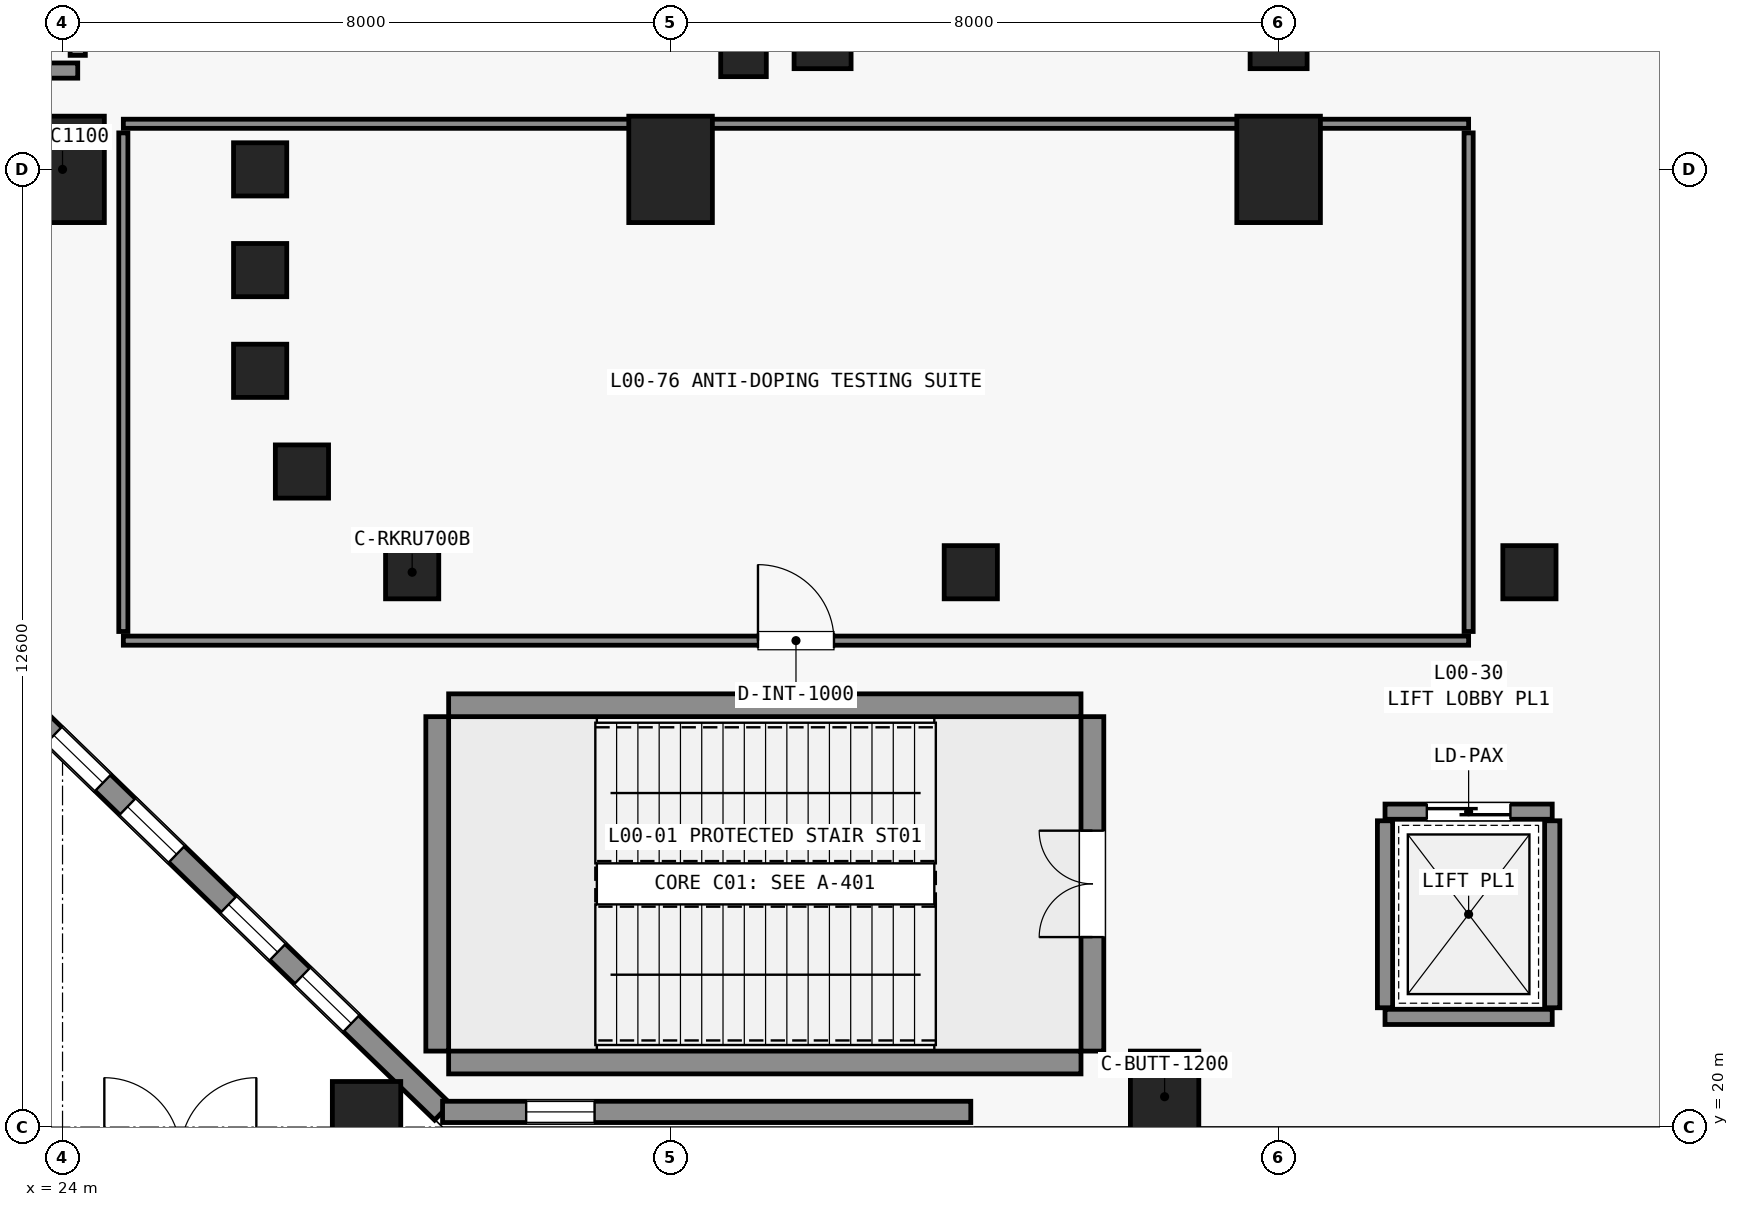
"""IFC4 building model, lengths in metres.
Left out: names, types, materials, properties, quantities, classifications, styles, units other than length and angle.
Written with IfcOpenShell. Run it as: python <this file> out.ifc"""

import sys

from ifc_helpers import new_model, si_unit, direction, frame, frame_2d, origin, origin_2d, place, context, subcontext, project, spatial, rectangle, extrude, element, fill, save


model = new_model("IFC4")
c1 = context("Model", 3, precision=1e-05, world=origin(), true_north=direction((0.0, 1.0)))
c2 = subcontext(c1, "Body", "Model", "MODEL_VIEW")
j1 = project(units=[si_unit("LENGTHUNIT", "METRE"), si_unit("PLANEANGLEUNIT", "RADIAN")], contexts=[c1])
p1 = place(None, origin())
s1 = spatial("IfcSite", under=j1, at=p1, CompositionType="ELEMENT")
p2 = place(p1, origin())
s2 = spatial("IfcBuilding", under=s1, at=p2, CompositionType="ELEMENT")
p3 = place(p2, origin())
s3 = spatial("IfcBuildingStorey", under=s2, at=p3, CompositionType="ELEMENT", Elevation=0.0)
for number, where, z_axis, x_axis in (
    (1, (24.0, 32.6, 0.0), (0.0, 0.0, 1.0), (1.0, 0.0, 0.0)),
    (2, (32.0, 32.6, 0.0), (0.0, 0.0, 1.0), (1.0, 0.0, 0.0)),
    (3, (40.0, 32.6, 0.0), (0.0, 0.0, 1.0), (1.0, 0.0, 0.0)),
):
    element("IfcColumn", number, at=place(p3, frame(where, z_axis=z_axis, x_axis=x_axis)), inside=s3, PredefinedType="COLUMN", context=c2, shape_type="SweptSolid", body=[
        extrude(rectangle(XDim=1.1, YDim=1.4, at=origin_2d()), origin(), (0.0, 0.0, 1.0), 6.0),
    ])
p4 = place(p3, frame((38.5, 20.4, 0.0), z_axis=(0.0, 0.0, 1.0), x_axis=(1.0, 0.0, 0.0)))
e4 = element("IfcColumn", 4, at=p4, inside=s3, PredefinedType="PILASTER", context=c2, shape_type="SweptSolid", body=[
    extrude(rectangle(XDim=0.9, YDim=1.2, at=origin_2d()), origin(), (0.0, 0.0, 1.0), 6.0),
])
p5 = place(p3, frame((28.0, 20.0, -0.45), z_axis=(0.0, 0.0, 1.0), x_axis=(1.0, 0.0, 0.0)))
e5 = element("IfcColumn", 5, at=p5, inside=s3, PredefinedType="PILASTER", context=c2, shape_type="SweptSolid", body=[
    extrude(rectangle(XDim=0.9, YDim=1.2, at=origin_2d()), origin(), (0.0, 0.0, 1.0), 6.45),
])
for number, where, z_axis, x_axis in (
    (6, (29.08, 20.85, 0.0), (0.0, 0.0, 1.0), (1.0, 0.0, 0.0)),
    (7, (29.08, 25.55, 0.0), (0.0, 0.0, 1.0), (1.0, 0.0, 0.0)),
):
    element("IfcWall", number, at=place(p3, frame(where, z_axis=z_axis, x_axis=x_axis)), inside=s3, PredefinedType="SHEAR", context=c2, shape_type="SweptSolid", body=[
        extrude(rectangle(XDim=8.32, YDim=0.3, at=frame_2d((4.16, 0.0))), origin(), (0.0, 0.0, 1.0), 6.0),
    ])
p6 = place(p3, frame((28.93, 21.0, 0.0), z_axis=(0.0, 0.0, 1.0), x_axis=(0.0, 1.0, 0.0)))
e8 = element("IfcWall", 8, at=p6, inside=s3, PredefinedType="SHEAR", context=c2, shape_type="SweptSolid", body=[
    extrude(rectangle(XDim=4.4, YDim=0.3, at=frame_2d((2.2, 0.0))), origin(), (0.0, 0.0, 1.0), 6.0),
])
p7 = place(p3, frame((37.55, 21.0, 0.0), z_axis=(0.0, 0.0, 1.0), x_axis=(0.0, 1.0, 0.0)))
e9 = element("IfcWall", 9, at=p7, inside=s3, PredefinedType="SHEAR", context=c2, shape_type="SweptSolid", body=[
    extrude(rectangle(XDim=4.4, YDim=0.3, at=frame_2d((2.2, 0.0))), origin(), (0.0, 0.0, 1.0), 6.0),
])
p8 = place(p7, frame((1.5, 0.0, 0.0)))
e10 = element("IfcOpeningElement", 10, at=p8, cuts=e9, PredefinedType="OPENING", context=c2, shape_type="SweptSolid", body=[
    extrude(rectangle(XDim=1.4, YDim=2.2, at=frame_2d((0.7, 1.1))), frame((0.0, 0.16, 0.0), z_axis=(0.0, -1.0, 0.0), x_axis=(1.0, 0.0, 0.0)), (0.0, 0.0, 1.0), 0.32),
])
p9 = place(p3, frame((34.0, 34.3, 0.0), z_axis=(0.0, 0.0, 1.0), x_axis=(1.0, 0.0, 0.0)))
e11 = element("IfcColumn", 11, at=p9, inside=s3, PredefinedType="COLUMN", context=c2, shape_type="SweptSolid", body=[
    extrude(rectangle(XDim=0.75, YDim=0.75, at=origin_2d()), origin(), (0.0, 0.0, 1.0), 6.0),
])
p10 = place(p3, frame((28.6, 27.3, 0.0), z_axis=(0.0, 0.0, 1.0), x_axis=(1.0, 0.0, 0.0)))
e12 = element("IfcColumn", 12, at=p10, inside=s3, PredefinedType="COLUMN", context=c2, shape_type="SweptSolid", body=[
    extrude(rectangle(XDim=0.7, YDim=0.7, at=origin_2d()), origin(), (0.0, 0.0, 1.0), 6.0),
])
p11 = place(p3, frame((40.0, 34.3, 0.0), z_axis=(0.0, 0.0, 1.0), x_axis=(1.0, 0.0, 0.0)))
e13 = element("IfcColumn", 13, at=p11, inside=s3, PredefinedType="COLUMN", context=c2, shape_type="SweptSolid", body=[
    extrude(rectangle(XDim=0.75, YDim=0.75, at=origin_2d()), origin(), (0.0, 0.0, 1.0), 6.0),
])
for number, where, z_axis, x_axis in (
    (14, (35.95, 27.3, 0.0), (0.0, 0.0, 1.0), (1.0, 0.0, 0.0)),
    (15, (43.3, 27.3, 0.0), (0.0, 0.0, 1.0), (1.0, 0.0, 0.0)),
    (16, (26.6, 32.6, 0.0), (0.0, 0.0, 1.0), (1.0, 0.0, 0.0)),
    (17, (26.6, 31.275, 0.0), (0.0, 0.0, 1.0), (1.0, 0.0, 0.0)),
    (18, (26.6, 29.95, 0.0), (0.0, 0.0, 1.0), (1.0, 0.0, 0.0)),
    (19, (27.15, 28.625, 0.0), (0.0, 0.0, 1.0), (1.0, 0.0, 0.0)),
):
    element("IfcColumn", number, at=place(p3, frame(where, z_axis=z_axis, x_axis=x_axis)), inside=s3, PredefinedType="COLUMN", context=c2, shape_type="SweptSolid", body=[
        extrude(rectangle(XDim=0.7, YDim=0.7, at=origin_2d()), origin(), (0.0, 0.0, 1.0), 6.0),
    ])
p12 = place(p3, frame((32.96, 34.12, 0.0), z_axis=(0.0, 0.0, 1.0), x_axis=(1.0, 0.0, 0.0)))
e20 = element("IfcColumn", 20, at=p12, inside=s3, PredefinedType="COLUMN", context=c2, shape_type="SweptSolid", body=[
    extrude(rectangle(XDim=0.6, YDim=0.6, at=origin_2d()), origin(), (0.0, 0.0, 1.0), 6.0),
])
p13 = place(p3, frame((41.4, 21.45, 0.0), z_axis=(0.0, 0.0, 1.0), x_axis=(1.0, 0.0, 0.0)))
e21 = element("IfcWall", 21, at=p13, inside=s3, PredefinedType="STANDARD", context=c2, shape_type="SweptSolid", body=[
    extrude(rectangle(XDim=2.2, YDim=0.2, at=frame_2d((1.1, 0.0))), origin(), (0.0, 0.0, 1.0), 5.64),
])
p14 = place(p3, frame((41.4, 24.15, 0.0), z_axis=(0.0, 0.0, 1.0), x_axis=(1.0, 0.0, 0.0)))
e22 = element("IfcWall", 22, at=p14, inside=s3, PredefinedType="STANDARD", context=c2, shape_type="SweptSolid", body=[
    extrude(rectangle(XDim=2.2, YDim=0.2, at=frame_2d((1.1, 0.0))), origin(), (0.0, 0.0, 1.0), 5.64),
])
p15 = place(p14, frame((0.55, 0.0, 0.0)))
e23 = element("IfcOpeningElement", 23, at=p15, cuts=e22, PredefinedType="OPENING", context=c2, shape_type="SweptSolid", body=[
    extrude(rectangle(XDim=1.1, YDim=2.15, at=frame_2d((0.55, 1.075))), frame((0.0, 0.11, 0.0), z_axis=(0.0, -1.0, 0.0), x_axis=(1.0, 0.0, 0.0)), (0.0, 0.0, 1.0), 0.22),
])
for number, where, z_axis, x_axis in (
    (24, (41.4, 21.57, 0.0), (0.0, 0.0, 1.0), (0.0, 1.0, 0.0)),
    (25, (43.6, 21.57, 0.0), (0.0, 0.0, 1.0), (0.0, 1.0, 0.0)),
):
    element("IfcWall", number, at=place(p3, frame(where, z_axis=z_axis, x_axis=x_axis)), inside=s3, PredefinedType="STANDARD", context=c2, shape_type="SweptSolid", body=[
        extrude(rectangle(XDim=2.46, YDim=0.2, at=frame_2d((1.23, 0.0))), origin(), (0.0, 0.0, 1.0), 5.64),
    ])
p16 = place(p3, frame((16.2, 32.6, 0.0), z_axis=(0.0, 0.0, 1.0), x_axis=(0.718237441527, -0.695798086796, 0.0)))
e26 = element("IfcWall", 26, at=p16, inside=s3, PredefinedType="STANDARD", context=c2, shape_type="SweptSolid", body=[
    extrude(rectangle(XDim=17.822, YDim=0.3, at=frame_2d((8.911, 0.0))), origin(), (0.0, 0.0, 1.0), 4.79),
])
p17 = place(p16, frame((1.1, 0.0, 0.95)))
e27 = element("IfcOpeningElement", 27, at=p17, cuts=e26, PredefinedType="OPENING", context=c2, shape_type="SweptSolid", body=[
    extrude(rectangle(XDim=0.9, YDim=2.85, at=frame_2d((0.45, 1.425))), frame((0.0, 0.16, 0.0), z_axis=(0.0, -1.0, 0.0), x_axis=(1.0, 0.0, 0.0)), (0.0, 0.0, 1.0), 0.32),
])
p18 = place(p16, frame((2.45, 0.0, 0.95)))
e28 = element("IfcOpeningElement", 28, at=p18, cuts=e26, PredefinedType="OPENING", context=c2, shape_type="SweptSolid", body=[
    extrude(rectangle(XDim=0.9, YDim=2.85, at=frame_2d((0.45, 1.425))), frame((0.0, 0.16, 0.0), z_axis=(0.0, -1.0, 0.0), x_axis=(1.0, 0.0, 0.0)), (0.0, 0.0, 1.0), 0.32),
])
p19 = place(p16, frame((4.3, 0.0, 0.95)))
e29 = element("IfcOpeningElement", 29, at=p19, cuts=e26, PredefinedType="OPENING", context=c2, shape_type="SweptSolid", body=[
    extrude(rectangle(XDim=0.9, YDim=2.85, at=frame_2d((0.45, 1.425))), frame((0.0, 0.16, 0.0), z_axis=(0.0, -1.0, 0.0), x_axis=(1.0, 0.0, 0.0)), (0.0, 0.0, 1.0), 0.32),
])
p20 = place(p16, frame((5.65, 0.0, 0.95)))
e30 = element("IfcOpeningElement", 30, at=p20, cuts=e26, PredefinedType="OPENING", context=c2, shape_type="SweptSolid", body=[
    extrude(rectangle(XDim=0.9, YDim=2.85, at=frame_2d((0.45, 1.425))), frame((0.0, 0.16, 0.0), z_axis=(0.0, -1.0, 0.0), x_axis=(1.0, 0.0, 0.0)), (0.0, 0.0, 1.0), 0.32),
])
p21 = place(p16, frame((7.5, 0.0, 0.95)))
e31 = element("IfcOpeningElement", 31, at=p21, cuts=e26, PredefinedType="OPENING", context=c2, shape_type="SweptSolid", body=[
    extrude(rectangle(XDim=0.9, YDim=2.85, at=frame_2d((0.45, 1.425))), frame((0.0, 0.16, 0.0), z_axis=(0.0, -1.0, 0.0), x_axis=(1.0, 0.0, 0.0)), (0.0, 0.0, 1.0), 0.32),
])
p22 = place(p16, frame((8.85, 0.0, 0.95)))
e32 = element("IfcOpeningElement", 32, at=p22, cuts=e26, PredefinedType="OPENING", context=c2, shape_type="SweptSolid", body=[
    extrude(rectangle(XDim=0.9, YDim=2.85, at=frame_2d((0.45, 1.425))), frame((0.0, 0.16, 0.0), z_axis=(0.0, -1.0, 0.0), x_axis=(1.0, 0.0, 0.0)), (0.0, 0.0, 1.0), 0.32),
])
p23 = place(p16, frame((10.7, 0.0, 0.95)))
e33 = element("IfcOpeningElement", 33, at=p23, cuts=e26, PredefinedType="OPENING", context=c2, shape_type="SweptSolid", body=[
    extrude(rectangle(XDim=0.9, YDim=2.85, at=frame_2d((0.45, 1.425))), frame((0.0, 0.16, 0.0), z_axis=(0.0, -1.0, 0.0), x_axis=(1.0, 0.0, 0.0)), (0.0, 0.0, 1.0), 0.32),
])
p24 = place(p16, frame((12.05, 0.0, 0.95)))
e34 = element("IfcOpeningElement", 34, at=p24, cuts=e26, PredefinedType="OPENING", context=c2, shape_type="SweptSolid", body=[
    extrude(rectangle(XDim=0.9, YDim=2.85, at=frame_2d((0.45, 1.425))), frame((0.0, 0.16, 0.0), z_axis=(0.0, -1.0, 0.0), x_axis=(1.0, 0.0, 0.0)), (0.0, 0.0, 1.0), 0.32),
])
p25 = place(p16, frame((13.9, 0.0, 0.95)))
e35 = element("IfcOpeningElement", 35, at=p25, cuts=e26, PredefinedType="OPENING", context=c2, shape_type="SweptSolid", body=[
    extrude(rectangle(XDim=0.9, YDim=2.85, at=frame_2d((0.45, 1.425))), frame((0.0, 0.16, 0.0), z_axis=(0.0, -1.0, 0.0), x_axis=(1.0, 0.0, 0.0)), (0.0, 0.0, 1.0), 0.32),
])
p26 = place(p16, frame((15.25, 0.0, 0.95)))
e36 = element("IfcOpeningElement", 36, at=p26, cuts=e26, PredefinedType="OPENING", context=c2, shape_type="SweptSolid", body=[
    extrude(rectangle(XDim=0.9, YDim=2.85, at=frame_2d((0.45, 1.425))), frame((0.0, 0.16, 0.0), z_axis=(0.0, -1.0, 0.0), x_axis=(1.0, 0.0, 0.0)), (0.0, 0.0, 1.0), 0.32),
])
p27 = place(p3, frame((29.0, 20.2, 0.0), z_axis=(0.0, 0.0, 1.0), x_axis=(1.0, 0.0, 0.0)))
e37 = element("IfcWall", 37, at=p27, inside=s3, PredefinedType="STANDARD", context=c2, shape_type="SweptSolid", body=[
    extrude(rectangle(XDim=6.95, YDim=0.28, at=frame_2d((3.475, 0.0))), origin(), (0.0, 0.0, 1.0), 5.64),
])
p28 = place(p27, frame((1.1, 0.0, 0.95)))
e38 = element("IfcOpeningElement", 38, at=p28, cuts=e37, PredefinedType="OPENING", context=c2, shape_type="SweptSolid", body=[
    extrude(rectangle(XDim=0.9, YDim=2.85, at=frame_2d((0.45, 1.425))), frame((0.0, 0.15, 0.0), z_axis=(0.0, -1.0, 0.0), x_axis=(1.0, 0.0, 0.0)), (0.0, 0.0, 1.0), 0.3),
])
p29 = place(p3, frame((20.4, 33.9, 0.0), z_axis=(0.0, 0.0, 1.0), x_axis=(1.0, 0.0, 0.0)))
e39 = element("IfcWall", 39, at=p29, inside=s3, PredefinedType="STANDARD", context=c2, shape_type="SweptSolid", body=[
    extrude(rectangle(XDim=3.8, YDim=0.2, at=frame_2d((1.9, 0.0))), origin(), (0.0, 0.0, 1.0), 4.79),
])
p30 = place(p3, frame((24.2, 34.1, 0.0), z_axis=(0.0, 0.0, 1.0), x_axis=(0.0, 1.0, 0.0)))
e40 = element("IfcWall", 40, at=p30, inside=s3, PredefinedType="STANDARD", context=c2, shape_type="SweptSolid", body=[
    extrude(rectangle(XDim=4.8, YDim=0.2, at=frame_2d((2.4, 0.0))), origin(), (0.0, 0.0, 1.0), 4.79),
])
p31 = place(p30, frame((1.7, 0.0, 0.0)))
e41 = element("IfcOpeningElement", 41, at=p31, cuts=e40, PredefinedType="OPENING", context=c2, shape_type="SweptSolid", body=[
    extrude(rectangle(XDim=1.4, YDim=2.2, at=frame_2d((0.7, 1.1))), frame((0.0, 0.11, 0.0), z_axis=(0.0, -1.0, 0.0), x_axis=(1.0, 0.0, 0.0)), (0.0, 0.0, 1.0), 0.22),
])
p32 = place(p3, frame((24.8, 26.4, 0.0), z_axis=(0.0, 0.0, 1.0), x_axis=(1.0, 0.0, 0.0)))
e42 = element("IfcWall", 42, at=p32, inside=s3, PredefinedType="PARTITIONING", context=c2, shape_type="SweptSolid", body=[
    extrude(rectangle(XDim=17.7, YDim=0.12, at=frame_2d((8.85, 0.0))), origin(), (0.0, 0.0, 1.0), 5.64),
])
p33 = place(p32, frame((8.35, 0.0, 0.0)))
e43 = element("IfcOpeningElement", 43, at=p33, cuts=e42, PredefinedType="OPENING", context=c2, shape_type="SweptSolid", body=[
    extrude(rectangle(XDim=1.0, YDim=2.15, at=frame_2d((0.5, 1.075))), frame((0.0, 0.07, 0.0), z_axis=(0.0, -1.0, 0.0), x_axis=(1.0, 0.0, 0.0)), (0.0, 0.0, 1.0), 0.14),
])
p34 = place(p3, frame((24.8, 33.2, 0.0), z_axis=(0.0, 0.0, 1.0), x_axis=(1.0, 0.0, 0.0)))
e44 = element("IfcWall", 44, at=p34, inside=s3, PredefinedType="PARTITIONING", context=c2, shape_type="SweptSolid", body=[
    extrude(rectangle(XDim=17.7, YDim=0.12, at=frame_2d((8.85, 0.0))), origin(), (0.0, 0.0, 1.0), 4.79),
])
for number, where, z_axis, x_axis in (
    (45, (24.8, 26.52, 0.0), (0.0, 0.0, 1.0), (0.0, 1.0, 0.0)),
    (46, (42.5, 26.52, 0.0), (0.0, 0.0, 1.0), (0.0, 1.0, 0.0)),
):
    element("IfcWall", number, at=place(p3, frame(where, z_axis=z_axis, x_axis=x_axis)), inside=s3, PredefinedType="PARTITIONING", context=c2, shape_type="SweptSolid", body=[
        extrude(rectangle(XDim=6.56, YDim=0.12, at=frame_2d((3.28, 0.0))), origin(), (0.0, 0.0, 1.0), 4.79),
    ])
p35 = place(p15, origin())
e47 = element("IfcDoor", 47, at=p35, inside=s3, OperationType="SLIDING_TO_LEFT", PredefinedType="DOOR", context=c2, shape_type="SweptSolid", body=[
    extrude(rectangle(XDim=1.1, YDim=2.15, at=frame_2d((0.55, 1.075))), frame((0.0, 0.025, 0.0), z_axis=(0.0, -1.0, 0.0), x_axis=(1.0, 0.0, 0.0)), (0.0, 0.0, 1.0), 0.05),
])
fill(e23, e47)
p36 = place(p23, origin())
e48 = element("IfcWindow", 48, at=p36, inside=s3, PartitioningType="DOUBLE_PANEL_VERTICAL", PredefinedType="WINDOW", context=c2, shape_type="SweptSolid", body=[
    extrude(rectangle(XDim=0.9, YDim=2.85, at=frame_2d((0.45, 1.425))), frame((0.0, 0.03, 0.0), z_axis=(0.0, -1.0, 0.0), x_axis=(1.0, 0.0, 0.0)), (0.0, 0.0, 1.0), 0.06),
])
fill(e33, e48)
p37 = place(p24, origin())
e49 = element("IfcWindow", 49, at=p37, inside=s3, PartitioningType="DOUBLE_PANEL_VERTICAL", PredefinedType="WINDOW", context=c2, shape_type="SweptSolid", body=[
    extrude(rectangle(XDim=0.9, YDim=2.85, at=frame_2d((0.45, 1.425))), frame((0.0, 0.03, 0.0), z_axis=(0.0, -1.0, 0.0), x_axis=(1.0, 0.0, 0.0)), (0.0, 0.0, 1.0), 0.06),
])
fill(e34, e49)
p38 = place(p25, origin())
e50 = element("IfcWindow", 50, at=p38, inside=s3, PartitioningType="DOUBLE_PANEL_VERTICAL", PredefinedType="WINDOW", context=c2, shape_type="SweptSolid", body=[
    extrude(rectangle(XDim=0.9, YDim=2.85, at=frame_2d((0.45, 1.425))), frame((0.0, 0.03, 0.0), z_axis=(0.0, -1.0, 0.0), x_axis=(1.0, 0.0, 0.0)), (0.0, 0.0, 1.0), 0.06),
])
fill(e35, e50)
p39 = place(p26, origin())
e51 = element("IfcWindow", 51, at=p39, inside=s3, PartitioningType="DOUBLE_PANEL_VERTICAL", PredefinedType="WINDOW", context=c2, shape_type="SweptSolid", body=[
    extrude(rectangle(XDim=0.9, YDim=2.85, at=frame_2d((0.45, 1.425))), frame((0.0, 0.03, 0.0), z_axis=(0.0, -1.0, 0.0), x_axis=(1.0, 0.0, 0.0)), (0.0, 0.0, 1.0), 0.06),
])
fill(e36, e51)
p40 = place(p28, origin())
e52 = element("IfcWindow", 52, at=p40, inside=s3, PartitioningType="DOUBLE_PANEL_VERTICAL", PredefinedType="WINDOW", context=c2, shape_type="SweptSolid", body=[
    extrude(rectangle(XDim=0.9, YDim=2.85, at=frame_2d((0.45, 1.425))), frame((0.0, 0.03, 0.0), z_axis=(0.0, -1.0, 0.0), x_axis=(1.0, 0.0, 0.0)), (0.0, 0.0, 1.0), 0.06),
])
fill(e38, e52)
p41 = place(p8, origin())
e53 = element("IfcDoor", 53, at=p41, inside=s3, OperationType="DOUBLE_DOOR_SINGLE_SWING", PredefinedType="DOOR", context=c2, shape_type="SweptSolid", body=[
    extrude(rectangle(XDim=1.4, YDim=2.2, at=frame_2d((0.7, 1.1))), frame((0.0, 0.025, 0.0), z_axis=(0.0, -1.0, 0.0), x_axis=(1.0, 0.0, 0.0)), (0.0, 0.0, 1.0), 0.05),
])
fill(e10, e53)
p42 = place(p33, origin())
e54 = element("IfcDoor", 54, at=p42, inside=s3, OperationType="SINGLE_SWING_LEFT", PredefinedType="DOOR", context=c2, shape_type="SweptSolid", body=[
    extrude(rectangle(XDim=1.0, YDim=2.15, at=frame_2d((0.5, 1.075))), frame((0.0, 0.025, 0.0), z_axis=(0.0, -1.0, 0.0), x_axis=(1.0, 0.0, 0.0)), (0.0, 0.0, 1.0), 0.05),
])
fill(e43, e54)
save(model, sys.argv[1])
